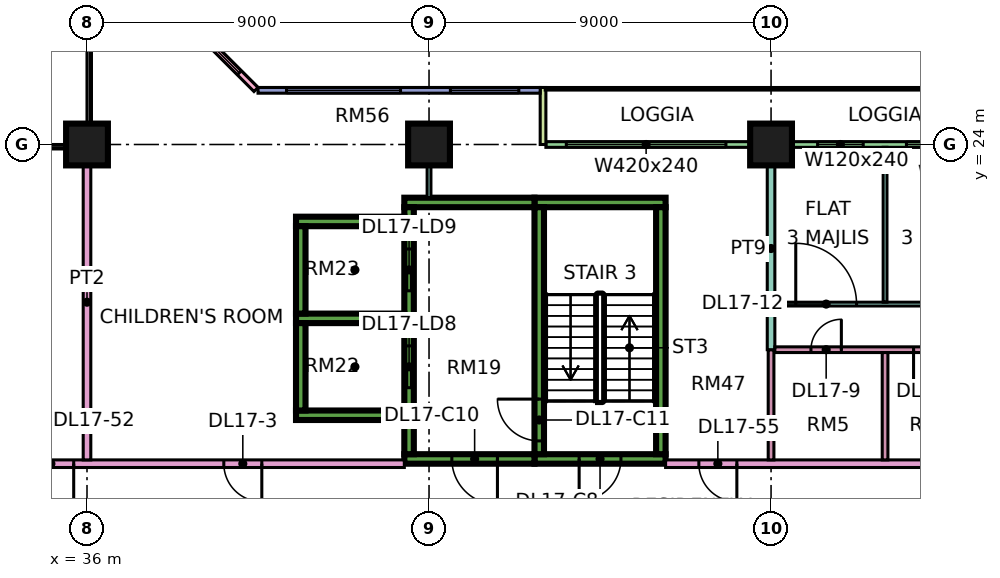
"""IFC4 building model, lengths in metres.
Left out: names, types, materials, properties, quantities, classifications, styles, units other than length and angle.
Written with IfcOpenShell. Run it as: python <this file> out.ifc"""

import sys

from ifc_helpers import new_model, si_unit, direction, frame, frame_2d, origin, origin_2d, place, context, subcontext, project, spatial, rectangle, extrude, element, fill, save


model = new_model("IFC4")
c1 = context("Model", 3, precision=1e-05, world=origin(), true_north=direction((0.0, 1.0)))
c2 = subcontext(c1, "Body", "Model", "MODEL_VIEW")
j1 = project(units=[si_unit("LENGTHUNIT", "METRE"), si_unit("PLANEANGLEUNIT", "RADIAN")], contexts=[c1])
p1 = place(None, origin())
s1 = spatial("IfcSite", under=j1, at=p1, CompositionType="ELEMENT")
p2 = place(p1, origin())
s2 = spatial("IfcBuilding", under=s1, at=p2, CompositionType="ELEMENT")
p3 = place(p2, frame((0.0, 0.0, 78.9)))
s3 = spatial("IfcBuildingStorey", under=s2, at=p3, CompositionType="ELEMENT", Elevation=78.9)
for number, where, z_axis, x_axis in (
    (1, (36.0, 24.0, 0.0), (0.0, 0.0, 1.0), (1.0, 0.0, 0.0)),
    (2, (45.0, 24.0, 0.0), (0.0, 0.0, 1.0), (1.0, 0.0, 0.0)),
    (3, (54.0, 24.0, 0.0), (0.0, 0.0, 1.0), (1.0, 0.0, 0.0)),
):
    element("IfcColumn", number, at=place(p3, frame(where, z_axis=z_axis, x_axis=x_axis)), inside=s3, PredefinedType="COLUMN", context=c2, shape_type="SweptSolid", body=[
        extrude(rectangle(XDim=1.1, YDim=1.1, at=origin_2d()), origin(), (0.0, 0.0, 1.0), 3.75),
    ])
p4 = place(p3, frame((47.775, 15.725, 0.0), z_axis=(0.0, 0.0, 1.0), x_axis=(1.0, 0.0, 0.0)))
e4 = element("IfcWall", 4, at=p4, inside=s3, PredefinedType="SHEAR", context=c2, shape_type="SweptSolid", body=[
    extrude(rectangle(XDim=3.45, YDim=0.25, at=frame_2d((1.725, 0.0))), origin(), (0.0, 0.0, 1.0), 3.75),
])
p5 = place(p4, frame((1.175, 0.0, 0.0)))
e5 = element("IfcOpeningElement", 5, at=p5, cuts=e4, PredefinedType="OPENING", context=c2, shape_type="SweptSolid", body=[
    extrude(rectangle(XDim=1.1, YDim=2.2, at=frame_2d((0.55, 1.1))), frame((0.0, 0.135, 0.0), z_axis=(0.0, -1.0, 0.0), x_axis=(1.0, 0.0, 0.0)), (0.0, 0.0, 1.0), 0.27),
])
p6 = place(p3, frame((47.775, 22.475, 0.0), z_axis=(0.0, 0.0, 1.0), x_axis=(1.0, 0.0, 0.0)))
e6 = element("IfcWall", 6, at=p6, inside=s3, PredefinedType="SHEAR", context=c2, shape_type="SweptSolid", body=[
    extrude(rectangle(XDim=3.45, YDim=0.25, at=frame_2d((1.725, 0.0))), origin(), (0.0, 0.0, 1.0), 3.75),
])
p7 = place(p3, frame((47.9, 15.85, 0.0), z_axis=(0.0, 0.0, 1.0), x_axis=(0.0, 1.0, 0.0)))
e7 = element("IfcWall", 7, at=p7, inside=s3, PredefinedType="SHEAR", context=c2, shape_type="SweptSolid", body=[
    extrude(rectangle(XDim=6.5, YDim=0.25, at=frame_2d((3.25, 0.0))), origin(), (0.0, 0.0, 1.0), 3.75),
])
p8 = place(p7, frame((0.35, 0.0, 0.0)))
e8 = element("IfcOpeningElement", 8, at=p8, cuts=e7, PredefinedType="OPENING", context=c2, shape_type="SweptSolid", body=[
    extrude(rectangle(XDim=1.1, YDim=2.2, at=frame_2d((0.55, 1.1))), frame((0.0, 0.135, 0.0), z_axis=(0.0, -1.0, 0.0), x_axis=(1.0, 0.0, 0.0)), (0.0, 0.0, 1.0), 0.27),
])
p9 = place(p3, frame((51.1, 15.85, 0.0), z_axis=(0.0, 0.0, 1.0), x_axis=(0.0, 1.0, 0.0)))
e9 = element("IfcWall", 9, at=p9, inside=s3, PredefinedType="SHEAR", context=c2, shape_type="SweptSolid", body=[
    extrude(rectangle(XDim=6.5, YDim=0.25, at=frame_2d((3.25, 0.0))), origin(), (0.0, 0.0, 1.0), 3.75),
])
p10 = place(p3, frame((44.35, 15.725, 0.0), z_axis=(0.0, 0.0, 1.0), x_axis=(1.0, 0.0, 0.0)))
e10 = element("IfcWall", 10, at=p10, inside=s3, PredefinedType="SHEAR", context=c2, shape_type="SweptSolid", body=[
    extrude(rectangle(XDim=3.425, YDim=0.25, at=frame_2d((1.712, 0.0))), origin(), (0.0, 0.0, 1.0), 3.75),
])
p11 = place(p10, frame((1.25, 0.0, 0.0)))
e11 = element("IfcOpeningElement", 11, at=p11, cuts=e10, PredefinedType="OPENING", context=c2, shape_type="SweptSolid", body=[
    extrude(rectangle(XDim=1.2, YDim=2.2, at=frame_2d((0.6, 1.1))), frame((0.0, 0.135, 0.0), z_axis=(0.0, -1.0, 0.0), x_axis=(1.0, 0.0, 0.0)), (0.0, 0.0, 1.0), 0.27),
])
p12 = place(p3, frame((44.35, 22.475, 0.0), z_axis=(0.0, 0.0, 1.0), x_axis=(1.0, 0.0, 0.0)))
e12 = element("IfcWall", 12, at=p12, inside=s3, PredefinedType="SHEAR", context=c2, shape_type="SweptSolid", body=[
    extrude(rectangle(XDim=3.425, YDim=0.25, at=frame_2d((1.712, 0.0))), origin(), (0.0, 0.0, 1.0), 3.75),
])
p13 = place(p3, frame((44.475, 15.85, 0.0), z_axis=(0.0, 0.0, 1.0), x_axis=(0.0, 1.0, 0.0)))
e13 = element("IfcWall", 13, at=p13, inside=s3, PredefinedType="SHEAR", context=c2, shape_type="SweptSolid", body=[
    extrude(rectangle(XDim=6.5, YDim=0.25, at=frame_2d((3.25, 0.0))), origin(), (0.0, 0.0, 1.0), 3.75),
])
p14 = place(p13, frame((1.75, 0.0, 0.0)))
e14 = element("IfcOpeningElement", 14, at=p14, cuts=e13, PredefinedType="OPENING", context=c2, shape_type="SweptSolid", body=[
    extrude(rectangle(XDim=1.1, YDim=2.2, at=frame_2d((0.55, 1.1))), frame((0.0, 0.135, 0.0), z_axis=(0.0, -1.0, 0.0), x_axis=(1.0, 0.0, 0.0)), (0.0, 0.0, 1.0), 0.27),
])
p15 = place(p13, frame((4.3, 0.0, 0.0)))
e15 = element("IfcOpeningElement", 15, at=p15, cuts=e13, PredefinedType="OPENING", context=c2, shape_type="SweptSolid", body=[
    extrude(rectangle(XDim=1.1, YDim=2.2, at=frame_2d((0.55, 1.1))), frame((0.0, 0.135, 0.0), z_axis=(0.0, -1.0, 0.0), x_axis=(1.0, 0.0, 0.0)), (0.0, 0.0, 1.0), 0.27),
])
for number, where, z_axis, x_axis in (
    (16, (41.5, 16.875, 0.0), (0.0, 0.0, 1.0), (1.0, 0.0, 0.0)),
    (17, (41.5, 19.425, 0.0), (0.0, 0.0, 1.0), (1.0, 0.0, 0.0)),
    (18, (41.5, 21.975, 0.0), (0.0, 0.0, 1.0), (1.0, 0.0, 0.0)),
):
    element("IfcWall", number, at=place(p3, frame(where, z_axis=z_axis, x_axis=x_axis)), inside=s3, PredefinedType="SHEAR", context=c2, shape_type="SweptSolid", body=[
        extrude(rectangle(XDim=2.85, YDim=0.25, at=frame_2d((1.425, 0.0))), origin(), (0.0, 0.0, 1.0), 3.75),
    ])
for number, where, z_axis, x_axis in (
    (19, (41.625, 17.0, 0.0), (0.0, 0.0, 1.0), (0.0, 1.0, 0.0)),
    (20, (41.625, 19.55, 0.0), (0.0, 0.0, 1.0), (0.0, 1.0, 0.0)),
):
    element("IfcWall", number, at=place(p3, frame(where, z_axis=z_axis, x_axis=x_axis)), inside=s3, PredefinedType="SHEAR", context=c2, shape_type="SweptSolid", body=[
        extrude(rectangle(XDim=2.3, YDim=0.25, at=frame_2d((1.15, 0.0))), origin(), (0.0, 0.0, 1.0), 3.75),
    ])
p16 = place(p3, frame((59.925, 24.0, 0.0), z_axis=(0.0, 0.0, 1.0), x_axis=(-1.0, 0.0, 0.0)))
e21 = element("IfcWall", 21, at=p16, inside=s3, PredefinedType="SOLIDWALL", context=c2, shape_type="SweptSolid", body=[
    extrude(rectangle(XDim=11.85, YDim=0.15, at=frame_2d((5.925, 0.0))), origin(), (0.0, 0.0, 1.0), 3.35),
])
p17 = place(p16, frame((0.562, 0.0, 0.45)))
e22 = element("IfcOpeningElement", 22, at=p17, cuts=e21, PredefinedType="OPENING", context=c2, shape_type="SweptSolid", body=[
    extrude(rectangle(XDim=1.8, YDim=2.4, at=frame_2d((0.9, 1.2))), frame((0.0, 0.085, 0.0), z_axis=(0.0, -1.0, 0.0), x_axis=(1.0, 0.0, 0.0)), (0.0, 0.0, 1.0), 0.17),
])
p18 = place(p16, frame((3.5, 0.0, 0.45)))
e23 = element("IfcOpeningElement", 23, at=p18, cuts=e21, PredefinedType="OPENING", context=c2, shape_type="SweptSolid", body=[
    extrude(rectangle(XDim=1.2, YDim=2.4, at=frame_2d((0.6, 1.2))), frame((0.0, 0.085, 0.0), z_axis=(0.0, -1.0, 0.0), x_axis=(1.0, 0.0, 0.0)), (0.0, 0.0, 1.0), 0.17),
])
p19 = place(p16, frame((7.113, 0.0, 0.45)))
e24 = element("IfcOpeningElement", 24, at=p19, cuts=e21, PredefinedType="OPENING", context=c2, shape_type="SweptSolid", body=[
    extrude(rectangle(XDim=4.2, YDim=2.4, at=frame_2d((2.1, 1.2))), frame((0.0, 0.085, 0.0), z_axis=(0.0, -1.0, 0.0), x_axis=(1.0, 0.0, 0.0)), (0.0, 0.0, 1.0), 0.17),
])
p20 = place(p3, frame((48.0, 25.5, 0.0), z_axis=(0.0, 0.0, 1.0), x_axis=(0.0, -1.0, 0.0)))
e25 = element("IfcWall", 25, at=p20, inside=s3, PredefinedType="SOLIDWALL", context=c2, shape_type="SweptSolid", body=[
    extrude(rectangle(XDim=1.5, YDim=0.15, at=frame_2d((0.75, 0.0))), origin(), (0.0, 0.0, 1.0), 3.35),
])
p21 = place(p3, frame((47.925, 25.425, 0.0), z_axis=(0.0, 0.0, 1.0), x_axis=(-1.0, 0.0, 0.0)))
e26 = element("IfcWall", 26, at=p21, inside=s3, PredefinedType="SOLIDWALL", context=c2, shape_type="SweptSolid", body=[
    extrude(rectangle(XDim=7.425, YDim=0.15, at=frame_2d((3.712, 0.0))), origin(), (0.0, 0.0, 1.0), 3.35),
])
p22 = place(p21, frame((0.562, 0.0, 0.45)))
e27 = element("IfcOpeningElement", 27, at=p22, cuts=e26, PredefinedType="OPENING", context=c2, shape_type="SweptSolid", body=[
    extrude(rectangle(XDim=1.8, YDim=2.4, at=frame_2d((0.9, 1.2))), frame((0.0, 0.085, 0.0), z_axis=(0.0, -1.0, 0.0), x_axis=(1.0, 0.0, 0.0)), (0.0, 0.0, 1.0), 0.17),
])
p23 = place(p21, frame((3.675, 0.0, 0.45)))
e28 = element("IfcOpeningElement", 28, at=p23, cuts=e26, PredefinedType="OPENING", context=c2, shape_type="SweptSolid", body=[
    extrude(rectangle(XDim=3.0, YDim=2.4, at=frame_2d((1.5, 1.2))), frame((0.0, 0.085, 0.0), z_axis=(0.0, -1.0, 0.0), x_axis=(1.0, 0.0, 0.0)), (0.0, 0.0, 1.0), 0.17),
])
p24 = place(p3, frame((40.447, 25.447, 0.0), z_axis=(0.0, 0.0, 1.0), x_axis=(-0.707106781187, 0.707106781187, 0.0)))
e29 = element("IfcWall", 29, at=p24, inside=s3, PredefinedType="SOLIDWALL", context=c2, shape_type="SweptSolid", body=[
    extrude(rectangle(XDim=4.243, YDim=0.15, at=frame_2d((2.121, 0.0))), origin(), (0.0, 0.0, 1.0), 3.35),
])
p25 = place(p24, frame((0.621, 0.0, 0.45)))
e30 = element("IfcOpeningElement", 30, at=p25, cuts=e29, PredefinedType="OPENING", context=c2, shape_type="SweptSolid", body=[
    extrude(rectangle(XDim=3.0, YDim=2.4, at=frame_2d((1.5, 1.2))), frame((0.0, 0.085, 0.0), z_axis=(0.0, -1.0, 0.0), x_axis=(1.0, 0.0, 0.0)), (0.0, 0.0, 1.0), 0.17),
])
p26 = place(p3, frame((34.0, 15.6, 0.0), z_axis=(0.0, 0.0, 1.0), x_axis=(1.0, 0.0, 0.0)))
e31 = element("IfcWall", 31, at=p26, inside=s3, PredefinedType="PARTITIONING", context=c2, shape_type="SweptSolid", body=[
    extrude(rectangle(XDim=10.35, YDim=0.2, at=frame_2d((5.175, 0.0))), origin(), (0.0, 0.0, 1.0), 3.35),
])
p27 = place(p26, frame((5.6, 0.0, 0.0)))
e32 = element("IfcOpeningElement", 32, at=p27, cuts=e31, PredefinedType="OPENING", context=c2, shape_type="SweptSolid", body=[
    extrude(rectangle(XDim=1.0, YDim=2.1, at=frame_2d((0.5, 1.05))), frame((0.0, 0.11, 0.0), z_axis=(0.0, -1.0, 0.0), x_axis=(1.0, 0.0, 0.0)), (0.0, 0.0, 1.0), 0.22),
])
p28 = place(p26, frame((0.45, 0.0, 0.0)))
e33 = element("IfcOpeningElement", 33, at=p28, cuts=e31, PredefinedType="OPENING", context=c2, shape_type="SweptSolid", body=[
    extrude(rectangle(XDim=1.2, YDim=2.1, at=frame_2d((0.6, 1.05))), frame((0.0, 0.11, 0.0), z_axis=(0.0, -1.0, 0.0), x_axis=(1.0, 0.0, 0.0)), (0.0, 0.0, 1.0), 0.22),
])
p29 = place(p3, frame((36.0, 15.7, 0.0), z_axis=(0.0, 0.0, 1.0), x_axis=(0.0, 1.0, 0.0)))
e34 = element("IfcWall", 34, at=p29, inside=s3, PredefinedType="PARTITIONING", context=c2, shape_type="SweptSolid", body=[
    extrude(rectangle(XDim=8.3, YDim=0.2, at=frame_2d((4.15, 0.0))), origin(), (0.0, 0.0, 1.0), 3.35),
])
p30 = place(p3, frame((45.0, 22.6, 0.0), z_axis=(0.0, 0.0, 1.0), x_axis=(0.0, 1.0, 0.0)))
e35 = element("IfcWall", 35, at=p30, inside=s3, PredefinedType="PARTITIONING", context=c2, shape_type="SweptSolid", body=[
    extrude(rectangle(XDim=1.4, YDim=0.1, at=frame_2d((0.7, 0.0))), origin(), (0.0, 0.0, 1.0), 3.35),
])
p31 = place(p3, frame((51.225, 15.6, 0.0), z_axis=(0.0, 0.0, 1.0), x_axis=(1.0, 0.0, 0.0)))
e36 = element("IfcWall", 36, at=p31, inside=s3, PredefinedType="PARTITIONING", context=c2, shape_type="SweptSolid", body=[
    extrude(rectangle(XDim=22.125, YDim=0.2, at=frame_2d((11.062, 0.0))), origin(), (0.0, 0.0, 1.0), 3.35),
])
p32 = place(p31, frame((12.425, 0.0, 0.0)))
e37 = element("IfcOpeningElement", 37, at=p32, cuts=e36, PredefinedType="OPENING", context=c2, shape_type="SweptSolid", body=[
    extrude(rectangle(XDim=1.0, YDim=2.1, at=frame_2d((0.5, 1.05))), frame((0.0, 0.11, 0.0), z_axis=(0.0, -1.0, 0.0), x_axis=(1.0, 0.0, 0.0)), (0.0, 0.0, 1.0), 0.22),
])
p33 = place(p31, frame((0.875, 0.0, 0.0)))
e38 = element("IfcOpeningElement", 38, at=p33, cuts=e36, PredefinedType="OPENING", context=c2, shape_type="SweptSolid", body=[
    extrude(rectangle(XDim=1.0, YDim=2.1, at=frame_2d((0.5, 1.05))), frame((0.0, 0.11, 0.0), z_axis=(0.0, -1.0, 0.0), x_axis=(1.0, 0.0, 0.0)), (0.0, 0.0, 1.0), 0.22),
])
p34 = place(p3, frame((54.0, 15.7, 0.0), z_axis=(0.0, 0.0, 1.0), x_axis=(0.0, 1.0, 0.0)))
e39 = element("IfcWall", 39, at=p34, inside=s3, PredefinedType="PARTITIONING", context=c2, shape_type="SweptSolid", body=[
    extrude(rectangle(XDim=2.9, YDim=0.15, at=frame_2d((1.45, 0.0))), origin(), (0.0, 0.0, 1.0), 3.35),
])
p35 = place(p3, frame((54.0, 18.6, 0.0), z_axis=(0.0, 0.0, 1.0), x_axis=(0.0, 1.0, 0.0)))
e40 = element("IfcWall", 40, at=p35, inside=s3, PredefinedType="PARTITIONING", context=c2, shape_type="SweptSolid", body=[
    extrude(rectangle(XDim=5.326, YDim=0.2, at=frame_2d((2.663, 0.0))), origin(), (0.0, 0.0, 1.0), 3.35),
])
p36 = place(p3, frame((54.1, 18.6, 0.0), z_axis=(0.0, 0.0, 1.0), x_axis=(1.0, 0.0, 0.0)))
e41 = element("IfcWall", 41, at=p36, inside=s3, PredefinedType="PARTITIONING", context=c2, shape_type="SweptSolid", body=[
    extrude(rectangle(XDim=8.975, YDim=0.15, at=frame_2d((4.487, 0.0))), origin(), (0.0, 0.0, 1.0), 3.35),
])
p37 = place(p36, frame((6.65, 0.0, 0.0)))
e42 = element("IfcOpeningElement", 42, at=p37, cuts=e41, PredefinedType="OPENING", context=c2, shape_type="SweptSolid", body=[
    extrude(rectangle(XDim=0.8, YDim=2.1, at=frame_2d((0.4, 1.05))), frame((0.0, 0.085, 0.0), z_axis=(0.0, -1.0, 0.0), x_axis=(1.0, 0.0, 0.0)), (0.0, 0.0, 1.0), 0.17),
])
p38 = place(p36, frame((3.65, 0.0, 0.0)))
e43 = element("IfcOpeningElement", 43, at=p38, cuts=e41, PredefinedType="OPENING", context=c2, shape_type="SweptSolid", body=[
    extrude(rectangle(XDim=0.9, YDim=2.1, at=frame_2d((0.45, 1.05))), frame((0.0, 0.085, 0.0), z_axis=(0.0, -1.0, 0.0), x_axis=(1.0, 0.0, 0.0)), (0.0, 0.0, 1.0), 0.17),
])
p39 = place(p36, frame((0.95, 0.0, 0.0)))
e44 = element("IfcOpeningElement", 44, at=p39, cuts=e41, PredefinedType="OPENING", context=c2, shape_type="SweptSolid", body=[
    extrude(rectangle(XDim=0.8, YDim=2.1, at=frame_2d((0.4, 1.05))), frame((0.0, 0.085, 0.0), z_axis=(0.0, -1.0, 0.0), x_axis=(1.0, 0.0, 0.0)), (0.0, 0.0, 1.0), 0.17),
])
p40 = place(p3, frame((54.1, 19.8, 0.0), z_axis=(0.0, 0.0, 1.0), x_axis=(1.0, 0.0, 0.0)))
e45 = element("IfcWall", 45, at=p40, inside=s3, PredefinedType="PARTITIONING", context=c2, shape_type="SweptSolid", body=[
    extrude(rectangle(XDim=8.95, YDim=0.1, at=frame_2d((4.475, 0.0))), origin(), (0.0, 0.0, 1.0), 3.35),
])
p41 = place(p40, frame((0.55, 0.0, 0.0)))
e46 = element("IfcOpeningElement", 46, at=p41, cuts=e45, PredefinedType="OPENING", context=c2, shape_type="SweptSolid", body=[
    extrude(rectangle(XDim=1.6, YDim=2.1, at=frame_2d((0.8, 1.05))), frame((0.0, 0.06, 0.0), z_axis=(0.0, -1.0, 0.0), x_axis=(1.0, 0.0, 0.0)), (0.0, 0.0, 1.0), 0.12),
])
p42 = place(p40, frame((3.95, 0.0, 0.0)))
e47 = element("IfcOpeningElement", 47, at=p42, cuts=e45, PredefinedType="OPENING", context=c2, shape_type="SweptSolid", body=[
    extrude(rectangle(XDim=0.9, YDim=2.1, at=frame_2d((0.45, 1.05))), frame((0.0, 0.06, 0.0), z_axis=(0.0, -1.0, 0.0), x_axis=(1.0, 0.0, 0.0)), (0.0, 0.0, 1.0), 0.12),
])
p43 = place(p3, frame((57.0, 15.7, 0.0), z_axis=(0.0, 0.0, 1.0), x_axis=(0.0, 1.0, 0.0)))
e48 = element("IfcWall", 48, at=p43, inside=s3, PredefinedType="PARTITIONING", context=c2, shape_type="SweptSolid", body=[
    extrude(rectangle(XDim=2.825, YDim=0.15, at=frame_2d((1.413, 0.0))), origin(), (0.0, 0.0, 1.0), 3.35),
])
p44 = place(p3, frame((57.0, 19.85, 0.0), z_axis=(0.0, 0.0, 1.0), x_axis=(0.0, 1.0, 0.0)))
e49 = element("IfcWall", 49, at=p44, inside=s3, PredefinedType="PARTITIONING", context=c2, shape_type="SweptSolid", body=[
    extrude(rectangle(XDim=4.076, YDim=0.1, at=frame_2d((2.038, 0.0))), origin(), (0.0, 0.0, 1.0), 3.35),
])
p45 = place(p17, origin())
e50 = element("IfcWindow", 50, at=p45, inside=s3, PartitioningType="SINGLE_PANEL", PredefinedType="WINDOW", context=c2, shape_type="SweptSolid", body=[
    extrude(rectangle(XDim=1.8, YDim=2.4, at=frame_2d((0.9, 1.2))), frame((0.0, 0.03, 0.0), z_axis=(0.0, -1.0, 0.0), x_axis=(1.0, 0.0, 0.0)), (0.0, 0.0, 1.0), 0.06),
])
fill(e22, e50)
p46 = place(p18, origin())
e51 = element("IfcWindow", 51, at=p46, inside=s3, PartitioningType="SINGLE_PANEL", PredefinedType="WINDOW", context=c2, shape_type="SweptSolid", body=[
    extrude(rectangle(XDim=1.2, YDim=2.4, at=frame_2d((0.6, 1.2))), frame((0.0, 0.03, 0.0), z_axis=(0.0, -1.0, 0.0), x_axis=(1.0, 0.0, 0.0)), (0.0, 0.0, 1.0), 0.06),
])
fill(e23, e51)
p47 = place(p19, origin())
e52 = element("IfcWindow", 52, at=p47, inside=s3, PartitioningType="SINGLE_PANEL", PredefinedType="WINDOW", context=c2, shape_type="SweptSolid", body=[
    extrude(rectangle(XDim=4.2, YDim=2.4, at=frame_2d((2.1, 1.2))), frame((0.0, 0.03, 0.0), z_axis=(0.0, -1.0, 0.0), x_axis=(1.0, 0.0, 0.0)), (0.0, 0.0, 1.0), 0.06),
])
fill(e24, e52)
p48 = place(p22, origin())
e53 = element("IfcWindow", 53, at=p48, inside=s3, PartitioningType="SINGLE_PANEL", PredefinedType="WINDOW", context=c2, shape_type="SweptSolid", body=[
    extrude(rectangle(XDim=1.8, YDim=2.4, at=frame_2d((0.9, 1.2))), frame((0.0, 0.03, 0.0), z_axis=(0.0, -1.0, 0.0), x_axis=(1.0, 0.0, 0.0)), (0.0, 0.0, 1.0), 0.06),
])
fill(e27, e53)
p49 = place(p23, origin())
e54 = element("IfcWindow", 54, at=p49, inside=s3, PartitioningType="SINGLE_PANEL", PredefinedType="WINDOW", context=c2, shape_type="SweptSolid", body=[
    extrude(rectangle(XDim=3.0, YDim=2.4, at=frame_2d((1.5, 1.2))), frame((0.0, 0.03, 0.0), z_axis=(0.0, -1.0, 0.0), x_axis=(1.0, 0.0, 0.0)), (0.0, 0.0, 1.0), 0.06),
])
fill(e28, e54)
p50 = place(p25, origin())
e55 = element("IfcWindow", 55, at=p50, inside=s3, PartitioningType="SINGLE_PANEL", PredefinedType="WINDOW", context=c2, shape_type="SweptSolid", body=[
    extrude(rectangle(XDim=3.0, YDim=2.4, at=frame_2d((1.5, 1.2))), frame((0.0, 0.03, 0.0), z_axis=(0.0, -1.0, 0.0), x_axis=(1.0, 0.0, 0.0)), (0.0, 0.0, 1.0), 0.06),
])
fill(e30, e55)
p51 = place(p5, frame((1.1, 0.0, 0.0), z_axis=(0.0, 0.0, 1.0), x_axis=(-1.0, 0.0, 0.0)))
e56 = element("IfcDoor", 56, at=p51, inside=s3, OperationType="SINGLE_SWING_LEFT", PredefinedType="DOOR", context=c2, shape_type="SweptSolid", body=[
    extrude(rectangle(XDim=1.1, YDim=2.2, at=frame_2d((0.55, 1.1))), frame((0.0, 0.025, 0.0), z_axis=(0.0, -1.0, 0.0), x_axis=(1.0, 0.0, 0.0)), (0.0, 0.0, 1.0), 0.05),
])
fill(e5, e56)
p52 = place(p11, origin())
e57 = element("IfcDoor", 57, at=p52, inside=s3, OperationType="SINGLE_SWING_RIGHT", PredefinedType="DOOR", context=c2, shape_type="SweptSolid", body=[
    extrude(rectangle(XDim=1.2, YDim=2.2, at=frame_2d((0.6, 1.1))), frame((0.0, 0.025, 0.0), z_axis=(0.0, -1.0, 0.0), x_axis=(1.0, 0.0, 0.0)), (0.0, 0.0, 1.0), 0.05),
])
fill(e11, e57)
p53 = place(p8, frame((1.1, 0.0, 0.0), z_axis=(0.0, 0.0, 1.0), x_axis=(-1.0, 0.0, 0.0)))
e58 = element("IfcDoor", 58, at=p53, inside=s3, OperationType="SINGLE_SWING_RIGHT", PredefinedType="DOOR", context=c2, shape_type="SweptSolid", body=[
    extrude(rectangle(XDim=1.1, YDim=2.2, at=frame_2d((0.55, 1.1))), frame((0.0, 0.025, 0.0), z_axis=(0.0, -1.0, 0.0), x_axis=(1.0, 0.0, 0.0)), (0.0, 0.0, 1.0), 0.05),
])
fill(e8, e58)
p54 = place(p14, origin())
e59 = element("IfcDoor", 59, at=p54, inside=s3, OperationType="DOUBLE_DOOR_SLIDING", PredefinedType="DOOR", context=c2, shape_type="SweptSolid", body=[
    extrude(rectangle(XDim=1.1, YDim=2.2, at=frame_2d((0.55, 1.1))), frame((0.0, 0.025, 0.0), z_axis=(0.0, -1.0, 0.0), x_axis=(1.0, 0.0, 0.0)), (0.0, 0.0, 1.0), 0.05),
])
fill(e14, e59)
p55 = place(p15, origin())
e60 = element("IfcDoor", 60, at=p55, inside=s3, OperationType="DOUBLE_DOOR_SLIDING", PredefinedType="DOOR", context=c2, shape_type="SweptSolid", body=[
    extrude(rectangle(XDim=1.1, YDim=2.2, at=frame_2d((0.55, 1.1))), frame((0.0, 0.025, 0.0), z_axis=(0.0, -1.0, 0.0), x_axis=(1.0, 0.0, 0.0)), (0.0, 0.0, 1.0), 0.05),
])
fill(e15, e60)
p56 = place(p27, origin())
e61 = element("IfcDoor", 61, at=p56, inside=s3, OperationType="SINGLE_SWING_RIGHT", PredefinedType="DOOR", context=c2, shape_type="SweptSolid", body=[
    extrude(rectangle(XDim=1.0, YDim=2.1, at=frame_2d((0.5, 1.05))), frame((0.0, 0.025, 0.0), z_axis=(0.0, -1.0, 0.0), x_axis=(1.0, 0.0, 0.0)), (0.0, 0.0, 1.0), 0.05),
])
fill(e32, e61)
p57 = place(p38, frame((0.9, 0.0, 0.0), z_axis=(0.0, 0.0, 1.0), x_axis=(-1.0, 0.0, 0.0)))
e62 = element("IfcDoor", 62, at=p57, inside=s3, OperationType="SINGLE_SWING_LEFT", PredefinedType="DOOR", context=c2, shape_type="SweptSolid", body=[
    extrude(rectangle(XDim=0.9, YDim=2.1, at=frame_2d((0.45, 1.05))), frame((0.0, 0.025, 0.0), z_axis=(0.0, -1.0, 0.0), x_axis=(1.0, 0.0, 0.0)), (0.0, 0.0, 1.0), 0.05),
])
fill(e43, e62)
p58 = place(p39, frame((0.8, 0.0, 0.0), z_axis=(0.0, 0.0, 1.0), x_axis=(-1.0, 0.0, 0.0)))
e63 = element("IfcDoor", 63, at=p58, inside=s3, OperationType="SINGLE_SWING_RIGHT", PredefinedType="DOOR", context=c2, shape_type="SweptSolid", body=[
    extrude(rectangle(XDim=0.8, YDim=2.1, at=frame_2d((0.4, 1.05))), frame((0.0, 0.025, 0.0), z_axis=(0.0, -1.0, 0.0), x_axis=(1.0, 0.0, 0.0)), (0.0, 0.0, 1.0), 0.05),
])
fill(e44, e63)
p59 = place(p41, origin())
e64 = element("IfcDoor", 64, at=p59, inside=s3, OperationType="DOUBLE_DOOR_SINGLE_SWING", PredefinedType="DOOR", context=c2, shape_type="SweptSolid", body=[
    extrude(rectangle(XDim=1.6, YDim=2.1, at=frame_2d((0.8, 1.05))), frame((0.0, 0.025, 0.0), z_axis=(0.0, -1.0, 0.0), x_axis=(1.0, 0.0, 0.0)), (0.0, 0.0, 1.0), 0.05),
])
fill(e46, e64)
p60 = place(p28, origin())
e65 = element("IfcDoor", 65, at=p60, inside=s3, OperationType="SINGLE_SWING_RIGHT", PredefinedType="DOOR", context=c2, shape_type="SweptSolid", body=[
    extrude(rectangle(XDim=1.2, YDim=2.1, at=frame_2d((0.6, 1.05))), frame((0.0, 0.025, 0.0), z_axis=(0.0, -1.0, 0.0), x_axis=(1.0, 0.0, 0.0)), (0.0, 0.0, 1.0), 0.05),
])
fill(e33, e65)
p61 = place(p33, origin())
e66 = element("IfcDoor", 66, at=p61, inside=s3, OperationType="SINGLE_SWING_RIGHT", PredefinedType="DOOR", context=c2, shape_type="SweptSolid", body=[
    extrude(rectangle(XDim=1.0, YDim=2.1, at=frame_2d((0.5, 1.05))), frame((0.0, 0.025, 0.0), z_axis=(0.0, -1.0, 0.0), x_axis=(1.0, 0.0, 0.0)), (0.0, 0.0, 1.0), 0.05),
])
fill(e38, e66)
save(model, sys.argv[1])
